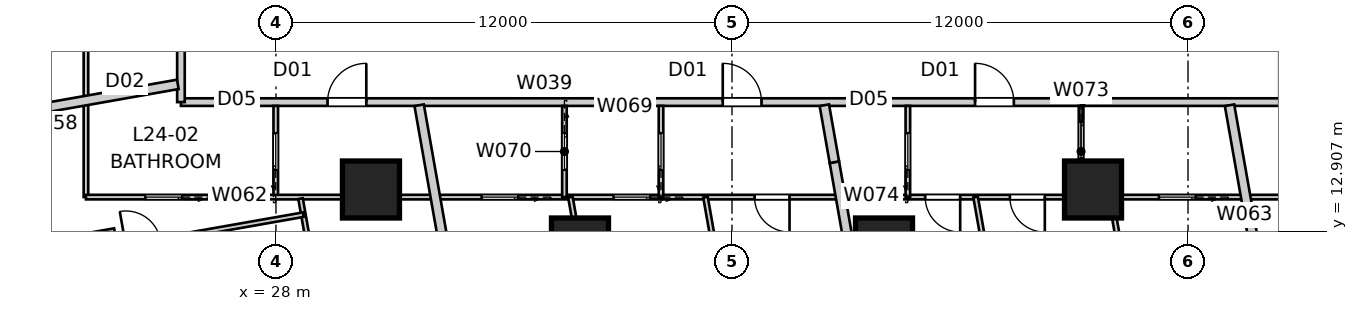
"""IFC4 building model, lengths in metres.
Left out: names, types, materials, properties, quantities, classifications, styles, units other than length and angle.
Written with IfcOpenShell. Run it as: python <this file> out.ifc"""

import sys

from ifc_helpers import new_model, si_unit, direction, frame, frame_2d, origin, origin_2d, place, context, subcontext, project, spatial, rectangle, extrude, element, fill, save


model = new_model("IFC4")
c1 = context("Model", 3, precision=1e-05, world=origin(), true_north=direction((0.0, 1.0)))
c2 = subcontext(c1, "Body", "Model", "MODEL_VIEW")
j1 = project(units=[si_unit("LENGTHUNIT", "METRE"), si_unit("PLANEANGLEUNIT", "RADIAN")], contexts=[c1])
p1 = place(None, origin())
s1 = spatial("IfcSite", under=j1, at=p1, CompositionType="ELEMENT")
p2 = place(p1, origin())
s2 = spatial("IfcBuilding", under=s1, at=p2, CompositionType="ELEMENT")
p3 = place(p2, frame((0.0, 0.0, 89.6)))
s3 = spatial("IfcBuildingStorey", under=s2, at=p3, CompositionType="ELEMENT", Elevation=89.6)
for number, where, z_axis, x_axis in (
    (1, (30.5, 14.0, 0.0), (0.0, 0.0, 1.0), (1.0, 0.0, 0.0)),
    (2, (36.0, 12.5, 0.0), (0.0, 0.0, 1.0), (1.0, 0.0, 0.0)),
    (3, (44.0, 12.5, 0.0), (0.0, 0.0, 1.0), (1.0, 0.0, 0.0)),
    (4, (49.5, 14.0, 0.0), (0.0, 0.0, 1.0), (1.0, 0.0, 0.0)),
):
    element("IfcColumn", number, at=place(p3, frame(where, z_axis=z_axis, x_axis=x_axis)), inside=s3, PredefinedType="COLUMN", context=c2, shape_type="SweptSolid", body=[
        extrude(rectangle(XDim=1.5, YDim=1.5, at=origin_2d()), origin(), (0.0, 0.0, 1.0), 3.4),
    ])
p4 = place(p3, frame((25.5, 16.3, 0.0), z_axis=(0.0, 0.0, 1.0), x_axis=(1.0, 0.0, 0.0)))
e5 = element("IfcWall", 5, at=p4, inside=s3, PredefinedType="PARTITIONING", context=c2, shape_type="SweptSolid", body=[
    extrude(rectangle(XDim=29.0, YDim=0.2, at=frame_2d((14.5, 0.0))), origin(), (0.0, 0.0, 1.0), 3.25),
])
p5 = place(p4, frame((20.896, 0.0, 0.0)))
e6 = element("IfcOpeningElement", 6, at=p5, cuts=e5, PredefinedType="OPENING", context=c2, shape_type="SweptSolid", body=[
    extrude(rectangle(XDim=1.02, YDim=2.34, at=frame_2d((0.51, 1.17))), frame((0.0, 0.11, 0.0), z_axis=(0.0, -1.0, 0.0), x_axis=(1.0, 0.0, 0.0)), (0.0, 0.0, 1.0), 0.22),
])
p6 = place(p4, frame((14.257, 0.0, 0.0)))
e7 = element("IfcOpeningElement", 7, at=p6, cuts=e5, PredefinedType="OPENING", context=c2, shape_type="SweptSolid", body=[
    extrude(rectangle(XDim=1.02, YDim=2.34, at=frame_2d((0.51, 1.17))), frame((0.0, 0.11, 0.0), z_axis=(0.0, -1.0, 0.0), x_axis=(1.0, 0.0, 0.0)), (0.0, 0.0, 1.0), 0.22),
])
p7 = place(p4, frame((3.857, 0.0, 0.0)))
e8 = element("IfcOpeningElement", 8, at=p7, cuts=e5, PredefinedType="OPENING", context=c2, shape_type="SweptSolid", body=[
    extrude(rectangle(XDim=1.02, YDim=2.34, at=frame_2d((0.51, 1.17))), frame((0.0, 0.11, 0.0), z_axis=(0.0, -1.0, 0.0), x_axis=(1.0, 0.0, 0.0)), (0.0, 0.0, 1.0), 0.22),
])
p8 = place(p3, frame((25.5, 43.7, 0.0), z_axis=(0.0, 0.0, 1.0), x_axis=(0.0, -1.0, 0.0)))
e9 = element("IfcWall", 9, at=p8, inside=s3, PredefinedType="PARTITIONING", context=c2, shape_type="SweptSolid", body=[
    extrude(rectangle(XDim=27.4, YDim=0.2, at=frame_2d((13.7, 0.0))), origin(), (0.0, 0.0, 1.0), 3.25),
])
p9 = place(p8, frame((24.333, 0.0, 0.0)))
e10 = element("IfcOpeningElement", 10, at=p9, cuts=e9, PredefinedType="OPENING", context=c2, shape_type="SweptSolid", body=[
    extrude(rectangle(XDim=1.02, YDim=2.1, at=frame_2d((0.51, 1.05))), frame((0.0, 0.11, 0.0), z_axis=(0.0, -1.0, 0.0), x_axis=(1.0, 0.0, 0.0)), (0.0, 0.0, 1.0), 0.22),
])
p10 = place(p8, frame((10.631, 0.0, 0.0)))
e11 = element("IfcOpeningElement", 11, at=p10, cuts=e9, PredefinedType="OPENING", context=c2, shape_type="SweptSolid", body=[
    extrude(rectangle(XDim=1.02, YDim=2.34, at=frame_2d((0.51, 1.17))), frame((0.0, 0.11, 0.0), z_axis=(0.0, -1.0, 0.0), x_axis=(1.0, 0.0, 0.0)), (0.0, 0.0, 1.0), 0.22),
])
p11 = place(p8, frame((0.911, 0.0, 0.0)))
e12 = element("IfcOpeningElement", 12, at=p11, cuts=e9, PredefinedType="OPENING", context=c2, shape_type="SweptSolid", body=[
    extrude(rectangle(XDim=1.02, YDim=2.34, at=frame_2d((0.51, 1.17))), frame((0.0, 0.11, 0.0), z_axis=(0.0, -1.0, 0.0), x_axis=(1.0, 0.0, 0.0)), (0.0, 0.0, 1.0), 0.22),
])
p12 = place(p3, frame((43.083, 12.513, 0.0), z_axis=(0.0, 0.0, 1.0), x_axis=(-0.17363609779, 0.984809882944, 0.0)))
e13 = element("IfcWall", 13, at=p12, inside=s3, PredefinedType="PARTITIONING", context=c2, shape_type="SweptSolid", body=[
    extrude(rectangle(XDim=2.24, YDim=0.25, at=frame_2d((1.12, 0.0))), origin(), (0.0, 0.0, 1.0), 2.796),
])
p13 = place(p3, frame((42.694, 14.719, 0.0), z_axis=(0.0, 0.0, 1.0), x_axis=(-0.173602272028, 0.984815846312, 0.0)))
e14 = element("IfcWall", 14, at=p13, inside=s3, PredefinedType="PARTITIONING", context=c2, shape_type="SweptSolid", body=[
    extrude(rectangle(XDim=1.522, YDim=0.25, at=frame_2d((0.761, 0.0))), origin(), (0.0, 0.0, 1.0), 3.25),
])
p14 = place(p3, frame((34.001, 3.556, 0.0), z_axis=(0.0, 0.0, 1.0), x_axis=(-0.173639088111, 0.984809355703, 0.0)))
e15 = element("IfcWall", 15, at=p14, inside=s3, PredefinedType="PARTITIONING", context=c2, shape_type="SweptSolid", body=[
    extrude(rectangle(XDim=12.857, YDim=0.25, at=frame_2d((6.428, 0.0))), origin(), (0.0, 0.0, 1.0), 3.25),
])
p15 = place(p3, frame((54.682, 7.203, 0.0), z_axis=(0.0, 0.0, 1.0), x_axis=(-0.173630137029, 0.984810933893, 0.0)))
e16 = element("IfcWall", 16, at=p15, inside=s3, PredefinedType="PARTITIONING", context=c2, shape_type="SweptSolid", body=[
    extrude(rectangle(XDim=9.154, YDim=0.25, at=frame_2d((4.577, 0.0))), origin(), (0.0, 0.0, 1.0), 3.25),
])
p16 = place(p3, frame((17.203, 15.318, 0.0), z_axis=(0.0, 0.0, 1.0), x_axis=(0.984807121942, 0.173651756605, 0.0)))
e17 = element("IfcWall", 17, at=p16, inside=s3, PredefinedType="PARTITIONING", context=c2, shape_type="SweptSolid", body=[
    extrude(rectangle(XDim=8.341, YDim=0.25, at=frame_2d((4.171, 0.0))), origin(), (0.0, 0.0, 1.0), 3.25),
])
p17 = place(p3, frame((23.0, 13.8, 0.0), z_axis=(0.0, 0.0, 1.0), x_axis=(0.0, 1.0, 0.0)))
e18 = element("IfcWall", 18, at=p17, inside=s3, PredefinedType="PARTITIONING", context=c2, shape_type="SweptSolid", body=[
    extrude(rectangle(XDim=6.094, YDim=0.12, at=frame_2d((3.047, 0.0))), origin(), (0.0, 0.0, 1.0), 3.25),
])
p18 = place(p17, frame((3.857, 0.0, 0.0)))
e19 = element("IfcOpeningElement", 19, at=p18, cuts=e18, PredefinedType="OPENING", context=c2, shape_type="SweptSolid", body=[
    extrude(rectangle(XDim=0.92, YDim=2.34, at=frame_2d((0.46, 1.17))), frame((0.0, 0.07, 0.0), z_axis=(0.0, -1.0, 0.0), x_axis=(1.0, 0.0, 0.0)), (0.0, 0.0, 1.0), 0.14),
])
p19 = place(p3, frame((27.995, 13.8, 0.0), z_axis=(0.0, 0.0, 1.0), x_axis=(0.0, 1.0, 0.0)))
e20 = element("IfcWall", 20, at=p19, inside=s3, PredefinedType="PARTITIONING", context=c2, shape_type="SweptSolid", body=[
    extrude(rectangle(XDim=2.4, YDim=0.12, at=frame_2d((1.2, 0.0))), origin(), (0.0, 0.0, 1.0), 3.25),
])
p20 = place(p19, frame((0.72, 0.0, 0.0)))
e21 = element("IfcOpeningElement", 21, at=p20, cuts=e20, PredefinedType="OPENING", context=c2, shape_type="SweptSolid", body=[
    extrude(rectangle(XDim=0.96, YDim=2.1, at=frame_2d((0.48, 1.05))), frame((0.0, 0.07, 0.0), z_axis=(0.0, -1.0, 0.0), x_axis=(1.0, 0.0, 0.0)), (0.0, 0.0, 1.0), 0.14),
])
p21 = place(p3, frame((57.0, 13.8, 0.0), z_axis=(0.0, 0.0, 1.0), x_axis=(-1.0, 0.0, 0.0)))
e22 = element("IfcWall", 22, at=p21, inside=s3, PredefinedType="PARTITIONING", context=c2, shape_type="SweptSolid", body=[
    extrude(rectangle(XDim=34.0, YDim=0.12, at=frame_2d((17.0, 0.0))), origin(), (0.0, 0.0, 1.0), 2.55),
])
p22 = place(p21, frame((8.768, 0.0, 0.0)))
e23 = element("IfcOpeningElement", 23, at=p22, cuts=e22, PredefinedType="OPENING", context=c2, shape_type="SweptSolid", body=[
    extrude(rectangle(XDim=0.92, YDim=2.34, at=frame_2d((0.46, 1.17))), frame((0.0, 0.07, 0.0), z_axis=(0.0, -1.0, 0.0), x_axis=(1.0, 0.0, 0.0)), (0.0, 0.0, 1.0), 0.14),
])
p23 = place(p21, frame((10.995, 0.0, 0.0)))
e24 = element("IfcOpeningElement", 24, at=p23, cuts=e22, PredefinedType="OPENING", context=c2, shape_type="SweptSolid", body=[
    extrude(rectangle(XDim=0.92, YDim=2.34, at=frame_2d((0.46, 1.17))), frame((0.0, 0.07, 0.0), z_axis=(0.0, -1.0, 0.0), x_axis=(1.0, 0.0, 0.0)), (0.0, 0.0, 1.0), 0.14),
])
p24 = place(p21, frame((15.486, 0.0, 0.0)))
e25 = element("IfcOpeningElement", 25, at=p24, cuts=e22, PredefinedType="OPENING", context=c2, shape_type="SweptSolid", body=[
    extrude(rectangle(XDim=0.92, YDim=2.34, at=frame_2d((0.46, 1.17))), frame((0.0, 0.07, 0.0), z_axis=(0.0, -1.0, 0.0), x_axis=(1.0, 0.0, 0.0)), (0.0, 0.0, 1.0), 0.14),
])
p25 = place(p21, frame((4.804, 0.0, 0.0)))
e26 = element("IfcOpeningElement", 26, at=p25, cuts=e22, PredefinedType="OPENING", context=c2, shape_type="SweptSolid", body=[
    extrude(rectangle(XDim=0.96, YDim=2.1, at=frame_2d((0.48, 1.05))), frame((0.0, 0.07, 0.0), z_axis=(0.0, -1.0, 0.0), x_axis=(1.0, 0.0, 0.0)), (0.0, 0.0, 1.0), 0.14),
])
p26 = place(p21, frame((19.155, 0.0, 0.0)))
e27 = element("IfcOpeningElement", 27, at=p26, cuts=e22, PredefinedType="OPENING", context=c2, shape_type="SweptSolid", body=[
    extrude(rectangle(XDim=0.96, YDim=2.1, at=frame_2d((0.48, 1.05))), frame((0.0, 0.07, 0.0), z_axis=(0.0, -1.0, 0.0), x_axis=(1.0, 0.0, 0.0)), (0.0, 0.0, 1.0), 0.14),
])
p27 = place(p21, frame((31.473, 0.0, 0.0)))
e28 = element("IfcOpeningElement", 28, at=p27, cuts=e22, PredefinedType="OPENING", context=c2, shape_type="SweptSolid", body=[
    extrude(rectangle(XDim=0.96, YDim=2.1, at=frame_2d((0.48, 1.05))), frame((0.0, 0.07, 0.0), z_axis=(0.0, -1.0, 0.0), x_axis=(1.0, 0.0, 0.0)), (0.0, 0.0, 1.0), 0.14),
])
p28 = place(p21, frame((1.261, 0.0, 0.0)))
e29 = element("IfcOpeningElement", 29, at=p28, cuts=e22, PredefinedType="OPENING", context=c2, shape_type="SweptSolid", body=[
    extrude(rectangle(XDim=0.96, YDim=2.1, at=frame_2d((0.48, 1.05))), frame((0.0, 0.07, 0.0), z_axis=(0.0, -1.0, 0.0), x_axis=(1.0, 0.0, 0.0)), (0.0, 0.0, 1.0), 0.14),
])
p29 = place(p21, frame((22.627, 0.0, 0.0)))
e30 = element("IfcOpeningElement", 30, at=p29, cuts=e22, PredefinedType="OPENING", context=c2, shape_type="SweptSolid", body=[
    extrude(rectangle(XDim=0.96, YDim=2.1, at=frame_2d((0.48, 1.05))), frame((0.0, 0.07, 0.0), z_axis=(0.0, -1.0, 0.0), x_axis=(1.0, 0.0, 0.0)), (0.0, 0.0, 1.0), 0.14),
])
p30 = place(p3, frame((28.648, 13.76, 0.0), z_axis=(0.0, 0.0, 1.0), x_axis=(0.173632532564, -0.984810511538, 0.0)))
e31 = element("IfcWall", 31, at=p30, inside=s3, PredefinedType="PARTITIONING", context=c2, shape_type="SweptSolid", body=[
    extrude(rectangle(XDim=10.938, YDim=0.12, at=frame_2d((5.469, 0.0))), origin(), (0.0, 0.0, 1.0), 2.638),
])
p31 = place(p30, frame((5.243, 0.0, 0.0)))
e32 = element("IfcOpeningElement", 32, at=p31, cuts=e31, PredefinedType="OPENING", context=c2, shape_type="SweptSolid", body=[
    extrude(rectangle(XDim=0.92, YDim=2.34, at=frame_2d((0.46, 1.17))), frame((0.0, 0.07, 0.0), z_axis=(0.0, -1.0, 0.0), x_axis=(1.0, 0.0, 0.0)), (0.0, 0.0, 1.0), 0.14),
])
p32 = place(p3, frame((23.831, 12.476, 0.0), z_axis=(0.0, 0.0, 1.0), x_axis=(0.984810765884, 0.173631089957, 0.0)))
e33 = element("IfcWall", 33, at=p32, inside=s3, PredefinedType="PARTITIONING", context=c2, shape_type="SweptSolid", body=[
    extrude(rectangle(XDim=4.966, YDim=0.12, at=frame_2d((2.483, 0.0))), origin(), (0.0, 0.0, 1.0), 3.25),
])
p33 = place(p32, frame((0.223, 0.0, 0.0)))
e34 = element("IfcOpeningElement", 34, at=p33, cuts=e33, PredefinedType="OPENING", context=c2, shape_type="SweptSolid", body=[
    extrude(rectangle(XDim=0.92, YDim=2.34, at=frame_2d((0.46, 1.17))), frame((0.0, 0.07, 0.0), z_axis=(0.0, -1.0, 0.0), x_axis=(1.0, 0.0, 0.0)), (0.0, 0.0, 1.0), 0.14),
])
p34 = place(p3, frame((23.753, 12.919, 0.0), z_axis=(0.0, 0.0, 1.0), x_axis=(-0.984806924634, -0.173652875567, 0.0)))
e35 = element("IfcWall", 35, at=p34, inside=s3, PredefinedType="PARTITIONING", context=c2, shape_type="SweptSolid", body=[
    extrude(rectangle(XDim=5.993, YDim=0.12, at=frame_2d((2.997, 0.0))), origin(), (0.0, 0.0, 1.0), 2.638),
])
p35 = place(p34, frame((2.557, 0.0, 0.0)))
e36 = element("IfcOpeningElement", 36, at=p35, cuts=e35, PredefinedType="OPENING", context=c2, shape_type="SweptSolid", body=[
    extrude(rectangle(XDim=0.92, YDim=2.34, at=frame_2d((0.46, 1.17))), frame((0.0, 0.07, 0.0), z_axis=(0.0, -1.0, 0.0), x_axis=(1.0, 0.0, 0.0)), (0.0, 0.0, 1.0), 0.14),
])
p36 = place(p3, frame((38.132, 13.8, 0.0), z_axis=(0.0, 0.0, 1.0), x_axis=(0.0, 1.0, 0.0)))
e37 = element("IfcWall", 37, at=p36, inside=s3, PredefinedType="PARTITIONING", context=c2, shape_type="SweptSolid", body=[
    extrude(rectangle(XDim=2.4, YDim=0.12, at=frame_2d((1.2, 0.0))), origin(), (0.0, 0.0, 1.0), 3.25),
])
p37 = place(p36, frame((0.72, 0.0, 0.0)))
e38 = element("IfcOpeningElement", 38, at=p37, cuts=e37, PredefinedType="OPENING", context=c2, shape_type="SweptSolid", body=[
    extrude(rectangle(XDim=0.96, YDim=2.1, at=frame_2d((0.48, 1.05))), frame((0.0, 0.07, 0.0), z_axis=(0.0, -1.0, 0.0), x_axis=(1.0, 0.0, 0.0)), (0.0, 0.0, 1.0), 0.14),
])
p38 = place(p3, frame((35.591, 16.2, 0.0), z_axis=(0.0, 0.0, 1.0), x_axis=(0.0, -1.0, 0.0)))
e39 = element("IfcWall", 39, at=p38, inside=s3, PredefinedType="PARTITIONING", context=c2, shape_type="SweptSolid", body=[
    extrude(rectangle(XDim=2.4, YDim=0.12, at=frame_2d((1.2, 0.0))), origin(), (0.0, 0.0, 1.0), 3.25),
])
p39 = place(p38, frame((0.72, 0.0, 0.0)))
e40 = element("IfcOpeningElement", 40, at=p39, cuts=e39, PredefinedType="OPENING", context=c2, shape_type="SweptSolid", body=[
    extrude(rectangle(XDim=0.96, YDim=2.1, at=frame_2d((0.48, 1.05))), frame((0.0, 0.07, 0.0), z_axis=(0.0, -1.0, 0.0), x_axis=(1.0, 0.0, 0.0)), (0.0, 0.0, 1.0), 0.14),
])
p40 = place(p3, frame((35.749, 13.8, 0.0), z_axis=(0.0, 0.0, 1.0), x_axis=(0.173650980998, -0.984807258705, 0.0)))
e41 = element("IfcWall", 41, at=p40, inside=s3, PredefinedType="PARTITIONING", context=c2, shape_type="SweptSolid", body=[
    extrude(rectangle(XDim=9.744, YDim=0.12, at=frame_2d((4.872, 0.0))), origin(), (0.0, 0.0, 1.0), 3.25),
])
p41 = place(p3, frame((39.302, 13.8, 0.0), z_axis=(0.0, 0.0, 1.0), x_axis=(0.173652576186, -0.984806977424, 0.0)))
e42 = element("IfcWall", 42, at=p41, inside=s3, PredefinedType="PARTITIONING", context=c2, shape_type="SweptSolid", body=[
    extrude(rectangle(XDim=9.127, YDim=0.12, at=frame_2d((4.563, 0.0))), origin(), (0.0, 0.0, 1.0), 3.25),
])
p42 = place(p3, frame((49.185, 16.2, 0.0), z_axis=(0.0, 0.0, 1.0), x_axis=(0.0, -1.0, 0.0)))
e43 = element("IfcWall", 43, at=p42, inside=s3, PredefinedType="PARTITIONING", context=c2, shape_type="SweptSolid", body=[
    extrude(rectangle(XDim=2.4, YDim=0.12, at=frame_2d((1.2, 0.0))), origin(), (0.0, 0.0, 1.0), 3.25),
])
p43 = place(p42, frame((0.42, 0.0, 0.0)))
e44 = element("IfcOpeningElement", 44, at=p43, cuts=e43, PredefinedType="OPENING", context=c2, shape_type="SweptSolid", body=[
    extrude(rectangle(XDim=0.96, YDim=2.1, at=frame_2d((0.48, 1.05))), frame((0.0, 0.07, 0.0), z_axis=(0.0, -1.0, 0.0), x_axis=(1.0, 0.0, 0.0)), (0.0, 0.0, 1.0), 0.14),
])
p44 = place(p3, frame((44.628, 13.8, 0.0), z_axis=(0.0, 0.0, 1.0), x_axis=(0.0, 1.0, 0.0)))
e45 = element("IfcWall", 45, at=p44, inside=s3, PredefinedType="PARTITIONING", context=c2, shape_type="SweptSolid", body=[
    extrude(rectangle(XDim=2.4, YDim=0.12, at=frame_2d((1.2, 0.0))), origin(), (0.0, 0.0, 1.0), 3.25),
])
p45 = place(p44, frame((0.72, 0.0, 0.0)))
e46 = element("IfcOpeningElement", 46, at=p45, cuts=e45, PredefinedType="OPENING", context=c2, shape_type="SweptSolid", body=[
    extrude(rectangle(XDim=0.96, YDim=2.1, at=frame_2d((0.48, 1.05))), frame((0.0, 0.07, 0.0), z_axis=(0.0, -1.0, 0.0), x_axis=(1.0, 0.0, 0.0)), (0.0, 0.0, 1.0), 0.14),
])
p46 = place(p3, frame((46.41, 13.8, 0.0), z_axis=(0.0, 0.0, 1.0), x_axis=(0.173645935638, -0.98480814834, 0.0)))
e47 = element("IfcWall", 47, at=p46, inside=s3, PredefinedType="PARTITIONING", context=c2, shape_type="SweptSolid", body=[
    extrude(rectangle(XDim=7.893, YDim=0.12, at=frame_2d((3.947, 0.0))), origin(), (0.0, 0.0, 1.0), 3.25),
])
p47 = place(p3, frame((49.964, 13.8, 0.0), z_axis=(0.0, 0.0, 1.0), x_axis=(0.173647508681, -0.984807870972, 0.0)))
e48 = element("IfcWall", 48, at=p47, inside=s3, PredefinedType="PARTITIONING", context=c2, shape_type="SweptSolid", body=[
    extrude(rectangle(XDim=7.276, YDim=0.12, at=frame_2d((3.638, 0.0))), origin(), (0.0, 0.0, 1.0), 3.25),
])
p48 = place(p5, origin())
e49 = element("IfcDoor", 49, at=p48, inside=s3, OperationType="SINGLE_SWING_LEFT", PredefinedType="DOOR", context=c2, shape_type="SweptSolid", body=[
    extrude(rectangle(XDim=1.02, YDim=2.34, at=frame_2d((0.51, 1.17))), frame((0.0, 0.025, 0.0), z_axis=(0.0, -1.0, 0.0), x_axis=(1.0, 0.0, 0.0)), (0.0, 0.0, 1.0), 0.05),
])
fill(e6, e49)
p49 = place(p6, origin())
e50 = element("IfcDoor", 50, at=p49, inside=s3, OperationType="SINGLE_SWING_LEFT", PredefinedType="DOOR", context=c2, shape_type="SweptSolid", body=[
    extrude(rectangle(XDim=1.02, YDim=2.34, at=frame_2d((0.51, 1.17))), frame((0.0, 0.025, 0.0), z_axis=(0.0, -1.0, 0.0), x_axis=(1.0, 0.0, 0.0)), (0.0, 0.0, 1.0), 0.05),
])
fill(e7, e50)
p50 = place(p7, origin())
e51 = element("IfcDoor", 51, at=p50, inside=s3, OperationType="SINGLE_SWING_RIGHT", PredefinedType="DOOR", context=c2, shape_type="SweptSolid", body=[
    extrude(rectangle(XDim=1.02, YDim=2.34, at=frame_2d((0.51, 1.17))), frame((0.0, 0.025, 0.0), z_axis=(0.0, -1.0, 0.0), x_axis=(1.0, 0.0, 0.0)), (0.0, 0.0, 1.0), 0.05),
])
fill(e8, e51)
p51 = place(p22, origin())
e52 = element("IfcDoor", 52, at=p51, inside=s3, OperationType="SINGLE_SWING_LEFT", PredefinedType="DOOR", context=c2, shape_type="SweptSolid", body=[
    extrude(rectangle(XDim=0.92, YDim=2.34, at=frame_2d((0.46, 1.17))), frame((0.0, 0.025, 0.0), z_axis=(0.0, -1.0, 0.0), x_axis=(1.0, 0.0, 0.0)), (0.0, 0.0, 1.0), 0.05),
])
fill(e23, e52)
p52 = place(p43, origin())
e53 = element("IfcDoor", 53, at=p52, inside=s3, OperationType="SLIDING_TO_LEFT", PredefinedType="DOOR", context=c2, shape_type="SweptSolid", body=[
    extrude(rectangle(XDim=0.96, YDim=2.1, at=frame_2d((0.48, 1.05))), frame((0.0, 0.025, 0.0), z_axis=(0.0, -1.0, 0.0), x_axis=(1.0, 0.0, 0.0)), (0.0, 0.0, 1.0), 0.05),
])
fill(e44, e53)
p53 = place(p45, origin())
e54 = element("IfcDoor", 54, at=p53, inside=s3, OperationType="SLIDING_TO_LEFT", PredefinedType="DOOR", context=c2, shape_type="SweptSolid", body=[
    extrude(rectangle(XDim=0.96, YDim=2.1, at=frame_2d((0.48, 1.05))), frame((0.0, 0.025, 0.0), z_axis=(0.0, -1.0, 0.0), x_axis=(1.0, 0.0, 0.0)), (0.0, 0.0, 1.0), 0.05),
])
fill(e46, e54)
p54 = place(p23, origin())
e55 = element("IfcDoor", 55, at=p54, inside=s3, OperationType="SINGLE_SWING_LEFT", PredefinedType="DOOR", context=c2, shape_type="SweptSolid", body=[
    extrude(rectangle(XDim=0.92, YDim=2.34, at=frame_2d((0.46, 1.17))), frame((0.0, 0.025, 0.0), z_axis=(0.0, -1.0, 0.0), x_axis=(1.0, 0.0, 0.0)), (0.0, 0.0, 1.0), 0.05),
])
fill(e24, e55)
p55 = place(p24, origin())
e56 = element("IfcDoor", 56, at=p55, inside=s3, OperationType="SINGLE_SWING_LEFT", PredefinedType="DOOR", context=c2, shape_type="SweptSolid", body=[
    extrude(rectangle(XDim=0.92, YDim=2.34, at=frame_2d((0.46, 1.17))), frame((0.0, 0.025, 0.0), z_axis=(0.0, -1.0, 0.0), x_axis=(1.0, 0.0, 0.0)), (0.0, 0.0, 1.0), 0.05),
])
fill(e25, e56)
p56 = place(p37, origin())
e57 = element("IfcDoor", 57, at=p56, inside=s3, OperationType="SLIDING_TO_LEFT", PredefinedType="DOOR", context=c2, shape_type="SweptSolid", body=[
    extrude(rectangle(XDim=0.96, YDim=2.1, at=frame_2d((0.48, 1.05))), frame((0.0, 0.025, 0.0), z_axis=(0.0, -1.0, 0.0), x_axis=(1.0, 0.0, 0.0)), (0.0, 0.0, 1.0), 0.05),
])
fill(e38, e57)
p57 = place(p20, origin())
e58 = element("IfcDoor", 58, at=p57, inside=s3, OperationType="SLIDING_TO_LEFT", PredefinedType="DOOR", context=c2, shape_type="SweptSolid", body=[
    extrude(rectangle(XDim=0.96, YDim=2.1, at=frame_2d((0.48, 1.05))), frame((0.0, 0.025, 0.0), z_axis=(0.0, -1.0, 0.0), x_axis=(1.0, 0.0, 0.0)), (0.0, 0.0, 1.0), 0.05),
])
fill(e21, e58)
p58 = place(p25, origin())
e59 = element("IfcDoor", 59, at=p58, inside=s3, OperationType="SLIDING_TO_LEFT", PredefinedType="DOOR", context=c2, shape_type="SweptSolid", body=[
    extrude(rectangle(XDim=0.96, YDim=2.1, at=frame_2d((0.48, 1.05))), frame((0.0, 0.025, 0.0), z_axis=(0.0, -1.0, 0.0), x_axis=(1.0, 0.0, 0.0)), (0.0, 0.0, 1.0), 0.05),
])
fill(e26, e59)
p59 = place(p26, origin())
e60 = element("IfcDoor", 60, at=p59, inside=s3, OperationType="SLIDING_TO_LEFT", PredefinedType="DOOR", context=c2, shape_type="SweptSolid", body=[
    extrude(rectangle(XDim=0.96, YDim=2.1, at=frame_2d((0.48, 1.05))), frame((0.0, 0.025, 0.0), z_axis=(0.0, -1.0, 0.0), x_axis=(1.0, 0.0, 0.0)), (0.0, 0.0, 1.0), 0.05),
])
fill(e27, e60)
p60 = place(p39, origin())
e61 = element("IfcDoor", 61, at=p60, inside=s3, OperationType="SLIDING_TO_LEFT", PredefinedType="DOOR", context=c2, shape_type="SweptSolid", body=[
    extrude(rectangle(XDim=0.96, YDim=2.1, at=frame_2d((0.48, 1.05))), frame((0.0, 0.025, 0.0), z_axis=(0.0, -1.0, 0.0), x_axis=(1.0, 0.0, 0.0)), (0.0, 0.0, 1.0), 0.05),
])
fill(e40, e61)
p61 = place(p27, origin())
e62 = element("IfcDoor", 62, at=p61, inside=s3, OperationType="SLIDING_TO_LEFT", PredefinedType="DOOR", context=c2, shape_type="SweptSolid", body=[
    extrude(rectangle(XDim=0.96, YDim=2.1, at=frame_2d((0.48, 1.05))), frame((0.0, 0.025, 0.0), z_axis=(0.0, -1.0, 0.0), x_axis=(1.0, 0.0, 0.0)), (0.0, 0.0, 1.0), 0.05),
])
fill(e28, e62)
p62 = place(p29, origin())
e63 = element("IfcDoor", 63, at=p62, inside=s3, OperationType="SLIDING_TO_LEFT", PredefinedType="DOOR", context=c2, shape_type="SweptSolid", body=[
    extrude(rectangle(XDim=0.96, YDim=2.1, at=frame_2d((0.48, 1.05))), frame((0.0, 0.025, 0.0), z_axis=(0.0, -1.0, 0.0), x_axis=(1.0, 0.0, 0.0)), (0.0, 0.0, 1.0), 0.05),
])
fill(e30, e63)
save(model, sys.argv[1])
